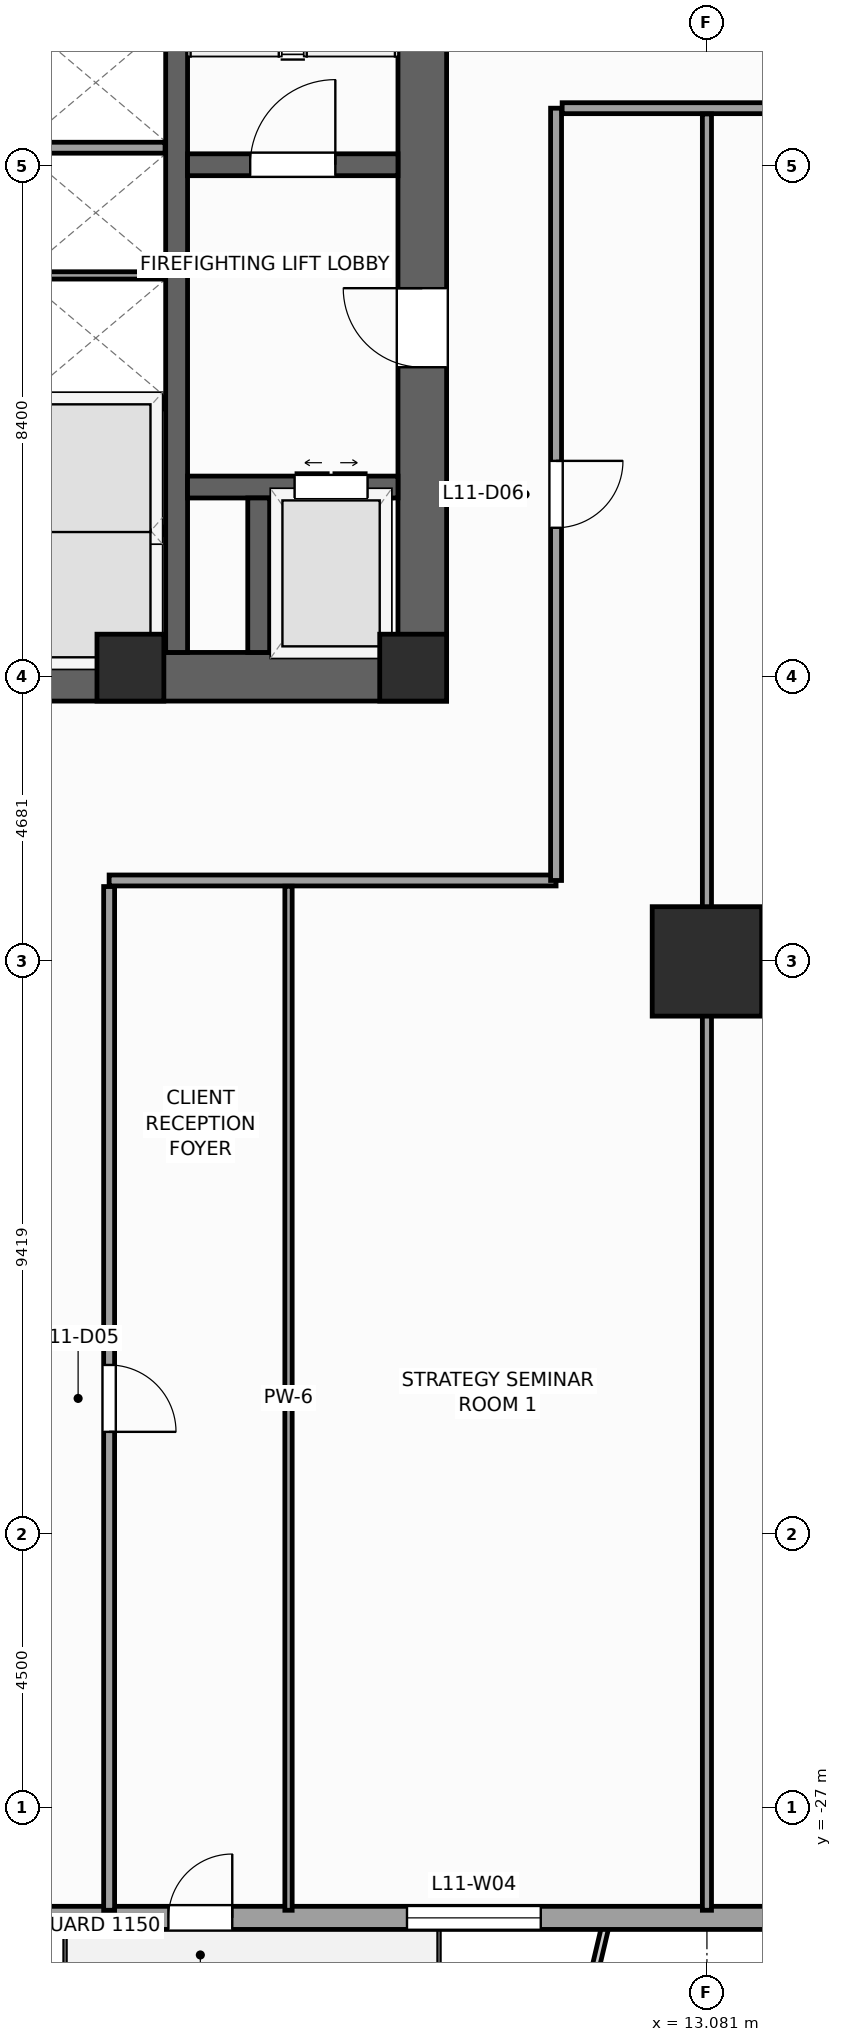
"""IFC4 building model, lengths in metres.
Left out: names, types, materials, properties, quantities, classifications, styles, units other than length and angle.
Written with IfcOpenShell. Run it as: python <this file> out.ifc"""

import sys

from ifc_helpers import new_model, si_unit, direction, frame, frame_2d, origin, origin_2d, place, context, subcontext, project, spatial, rectangle, extrude, source, transform, mapped, element, fill, save


model = new_model("IFC4")
c1 = context("Model", 3, precision=1e-05, world=origin(), true_north=direction((0.0, 1.0)))
c2 = subcontext(c1, "Body", "Model", "MODEL_VIEW")
j1 = project(units=[si_unit("LENGTHUNIT", "METRE"), si_unit("PLANEANGLEUNIT", "RADIAN")], contexts=[c1])
p1 = place(None, origin())
s1 = spatial("IfcSite", under=j1, at=p1, CompositionType="ELEMENT")
p2 = place(p1, origin())
s2 = spatial("IfcBuilding", under=s1, at=p2, CompositionType="ELEMENT")
p3 = place(p2, frame((0.0, 0.0, 50.0)))
s3 = spatial("IfcBuildingStorey", under=s2, at=p3, CompositionType="ELEMENT", Elevation=50.0)
p4 = place(p3, frame((-8.8, -8.4, 0.0), z_axis=(0.0, 0.0, 1.0), x_axis=(1.0, 0.0, 0.0)))
e1 = element("IfcWall", 1, at=p4, inside=s3, PredefinedType="SHEAR", context=c2, shape_type="SweptSolid", body=[
    extrude(rectangle(XDim=17.6, YDim=0.8, at=frame_2d((8.8, 0.0))), origin(), (0.0, 0.0, 1.0), 4.0),
])
p5 = place(p4, frame((8.15, 0.0, 0.0)))
e2 = element("IfcOpeningElement", 2, at=p5, cuts=e1, PredefinedType="OPENING", context=c2, shape_type="SweptSolid", body=[
    extrude(rectangle(XDim=1.3, YDim=2.2, at=frame_2d((0.65, 1.1))), frame((0.0, 0.41, 0.0), z_axis=(0.0, -1.0, 0.0), x_axis=(1.0, 0.0, 0.0)), (0.0, 0.0, 1.0), 0.82),
])
p6 = place(p3, frame((8.4, -8.0, 0.0), z_axis=(0.0, 0.0, 1.0), x_axis=(0.0, 1.0, 0.0)))
e3 = element("IfcWall", 3, at=p6, inside=s3, PredefinedType="SHEAR", context=c2, shape_type="SweptSolid", body=[
    extrude(rectangle(XDim=16.0, YDim=0.8, at=frame_2d((8.0, 0.0))), origin(), (0.0, 0.0, 1.0), 4.0),
])
p7 = place(p6, frame((4.69, 0.0, 0.0)))
e4 = element("IfcOpeningElement", 4, at=p7, cuts=e3, PredefinedType="OPENING", context=c2, shape_type="SweptSolid", body=[
    extrude(rectangle(XDim=1.3, YDim=2.2, at=frame_2d((0.65, 1.1))), frame((0.0, 0.41, 0.0), z_axis=(0.0, -1.0, 0.0), x_axis=(1.0, 0.0, 0.0)), (0.0, 0.0, 1.0), 0.82),
])
p8 = place(p3, frame((4.36, -8.0, 0.0), z_axis=(0.0, 0.0, 1.0), x_axis=(0.0, 1.0, 0.0)))
e5 = element("IfcWall", 5, at=p8, inside=s3, PredefinedType="SHEAR", context=c2, shape_type="SweptSolid", body=[
    extrude(rectangle(XDim=16.0, YDim=0.36, at=frame_2d((8.0, 0.0))), origin(), (0.0, 0.0, 1.0), 4.0),
])
p9 = place(p3, frame((4.54, 0.02, 0.0), z_axis=(0.0, 0.0, 1.0), x_axis=(1.0, 0.0, 0.0)))
e6 = element("IfcWall", 6, at=p9, inside=s3, PredefinedType="SHEAR", context=c2, shape_type="SweptSolid", body=[
    extrude(rectangle(XDim=3.46, YDim=0.36, at=frame_2d((1.73, 0.0))), origin(), (0.0, 0.0, 1.0), 4.0),
])
p10 = place(p9, frame((1.03, 0.0, 0.0)))
e7 = element("IfcOpeningElement", 7, at=p10, cuts=e6, PredefinedType="OPENING", context=c2, shape_type="SweptSolid", body=[
    extrude(rectangle(XDim=1.4, YDim=2.2, at=frame_2d((0.7, 1.1))), frame((0.0, 0.19, 0.0), z_axis=(0.0, -1.0, 0.0), x_axis=(1.0, 0.0, 0.0)), (0.0, 0.0, 1.0), 0.38),
])
p11 = place(p3, frame((4.54, -5.28, 0.0), z_axis=(0.0, 0.0, 1.0), x_axis=(1.0, 0.0, 0.0)))
e8 = element("IfcWall", 8, at=p11, inside=s3, PredefinedType="SHEAR", context=c2, shape_type="SweptSolid", body=[
    extrude(rectangle(XDim=3.46, YDim=0.36, at=frame_2d((1.73, 0.0))), origin(), (0.0, 0.0, 1.0), 4.0),
])
p12 = place(p11, frame((1.76, 0.0, 0.0)))
e9 = element("IfcOpeningElement", 9, at=p12, cuts=e8, PredefinedType="OPENING", context=c2, shape_type="SweptSolid", body=[
    extrude(rectangle(XDim=1.2, YDim=2.25, at=frame_2d((0.6, 1.125))), frame((0.0, 0.19, 0.0), z_axis=(0.0, -1.0, 0.0), x_axis=(1.0, 0.0, 0.0)), (0.0, 0.0, 1.0), 0.38),
])
p13 = place(p3, frame((5.71, -8.0, 0.0), z_axis=(0.0, 0.0, 1.0), x_axis=(0.0, 1.0, 0.0)))
e10 = element("IfcWall", 10, at=p13, inside=s3, PredefinedType="SHEAR", context=c2, shape_type="SweptSolid", body=[
    extrude(rectangle(XDim=2.54, YDim=0.36, at=frame_2d((1.27, 0.0))), origin(), (0.0, 0.0, 1.0), 4.0),
])
m1 = source(origin(), c2, "Body", "SweptSolid", [
    extrude(rectangle(XDim=1.1, YDim=1.1, at=origin_2d()), origin(), (0.0, 0.0, 1.0), 4.0),
])
for number, where, z_axis, x_axis in (
    (11, (8.25, -8.25, 0.0), (0.0, 0.0, 1.0), (1.0, 0.0, 0.0)),
    (12, (3.6, -8.25, 0.0), (0.0, 0.0, 1.0), (1.0, 0.0, 0.0)),
):
    element("IfcColumn", number, at=place(p3, frame(where, z_axis=z_axis, x_axis=x_axis)), inside=s3, PredefinedType="PILASTER", context=c2, shape_type="MappedRepresentation", body=[
        mapped(m1, transform((0.0, 0.0, 0.0), scale=1.0)),
    ])
m2 = source(origin(), c2, "Body", "SweptSolid", [
    extrude(rectangle(XDim=1.8, YDim=1.8, at=origin_2d()), origin(), (0.0, 0.0, 1.0), 4.0),
])
p14 = place(p3, frame((13.081, -13.081, 0.0), z_axis=(0.0, 0.0, 1.0), x_axis=(1.0, 0.0, 0.0)))
e13 = element("IfcColumn", 13, at=p14, inside=s3, PredefinedType="COLUMN", context=c2, shape_type="MappedRepresentation", body=[
    mapped(m2, transform((0.0, 0.0, 0.0), scale=1.0)),
])
p15 = place(p3, frame((-25.69, -28.81, 0.0), z_axis=(0.0, 0.0, 1.0), x_axis=(1.0, 0.0, 0.0)))
e14 = element("IfcWall", 14, at=p15, inside=s3, PredefinedType="STANDARD", context=c2, shape_type="SweptSolid", body=[
    extrude(rectangle(XDim=51.38, YDim=0.38, at=frame_2d((25.69, 0.0))), origin(), (0.0, 0.0, 1.0), 3.12),
])
p16 = place(p15, frame((29.915, 0.0, 0.0)))
e15 = element("IfcOpeningElement", 15, at=p16, cuts=e14, PredefinedType="OPENING", context=c2, shape_type="SweptSolid", body=[
    extrude(rectangle(XDim=1.05, YDim=2.25, at=frame_2d((0.525, 1.125))), frame((0.0, 0.2, 0.0), z_axis=(0.0, -1.0, 0.0), x_axis=(1.0, 0.0, 0.0)), (0.0, 0.0, 1.0), 0.4),
])
p17 = place(p15, frame((5.466, 0.0, 0.49)))
e16 = element("IfcOpeningElement", 16, at=p17, cuts=e14, PredefinedType="OPENING", context=c2, shape_type="SweptSolid", body=[
    extrude(rectangle(XDim=1.4, YDim=2.4, at=frame_2d((0.7, 1.2))), frame((0.0, 0.2, 0.0), z_axis=(0.0, -1.0, 0.0), x_axis=(1.0, 0.0, 0.0)), (0.0, 0.0, 1.0), 0.4),
])
p18 = place(p15, frame((13.8, 0.0, 0.49)))
e17 = element("IfcOpeningElement", 17, at=p18, cuts=e14, PredefinedType="OPENING", context=c2, shape_type="SweptSolid", body=[
    extrude(rectangle(XDim=2.2, YDim=2.4, at=frame_2d((1.1, 1.2))), frame((0.0, 0.2, 0.0), z_axis=(0.0, -1.0, 0.0), x_axis=(1.0, 0.0, 0.0)), (0.0, 0.0, 1.0), 0.4),
])
p19 = place(p15, frame((22.062, 0.0, 0.49)))
e18 = element("IfcOpeningElement", 18, at=p19, cuts=e14, PredefinedType="OPENING", context=c2, shape_type="SweptSolid", body=[
    extrude(rectangle(XDim=2.2, YDim=2.4, at=frame_2d((1.1, 1.2))), frame((0.0, 0.2, 0.0), z_axis=(0.0, -1.0, 0.0), x_axis=(1.0, 0.0, 0.0)), (0.0, 0.0, 1.0), 0.4),
])
p20 = place(p15, frame((33.838, 0.0, 0.49)))
e19 = element("IfcOpeningElement", 19, at=p20, cuts=e14, PredefinedType="OPENING", context=c2, shape_type="SweptSolid", body=[
    extrude(rectangle(XDim=2.2, YDim=2.4, at=frame_2d((1.1, 1.2))), frame((0.0, 0.2, 0.0), z_axis=(0.0, -1.0, 0.0), x_axis=(1.0, 0.0, 0.0)), (0.0, 0.0, 1.0), 0.4),
])
p21 = place(p15, frame((43.487, 0.0, 0.49)))
e20 = element("IfcOpeningElement", 20, at=p21, cuts=e14, PredefinedType="OPENING", context=c2, shape_type="SweptSolid", body=[
    extrude(rectangle(XDim=1.4, YDim=2.4, at=frame_2d((0.7, 1.2))), frame((0.0, 0.2, 0.0), z_axis=(0.0, -1.0, 0.0), x_axis=(1.0, 0.0, 0.0)), (0.0, 0.0, 1.0), 0.4),
])
for number, where, z_axis, x_axis in (
    (21, (1.89, -3.9, 0.0), (0.0, 0.0, 1.0), (1.0, 0.0, 0.0)),
    (22, (1.89, 0.3, 0.0), (0.0, 0.0, 1.0), (1.0, 0.0, 0.0)),
):
    element("IfcWall", number, at=place(p3, frame(where, z_axis=z_axis, x_axis=x_axis)), inside=s3, PredefinedType="PARTITIONING", context=c2, shape_type="SweptSolid", body=[
        extrude(rectangle(XDim=2.28, YDim=0.18, at=frame_2d((1.14, 0.0))), origin(), (0.0, 0.0, 1.0), 3.72),
    ])
for number, where, z_axis, x_axis in (
    (23, (1.9, -6.0, 0.0), (0.0, 0.0, 1.0), (1.0, 0.0, 0.0)),
    (24, (1.9, -1.8, 0.0), (0.0, 0.0, 1.0), (1.0, 0.0, 0.0)),
):
    element("IfcWall", number, at=place(p3, frame(where, z_axis=z_axis, x_axis=x_axis)), inside=s3, PredefinedType="PARTITIONING", context=c2, shape_type="SweptSolid", body=[
        extrude(rectangle(XDim=2.26, YDim=0.12, at=frame_2d((1.13, 0.0))), origin(), (0.0, 0.0, 1.0), 3.72),
    ])
p22 = place(p3, frame((3.25, -11.75, 0.0), z_axis=(0.0, 0.0, 1.0), x_axis=(1.0, 0.0, 0.0)))
e25 = element("IfcWall", 25, at=p22, inside=s3, PredefinedType="PARTITIONING", context=c2, shape_type="SweptSolid", body=[
    extrude(rectangle(XDim=7.35, YDim=0.18, at=frame_2d((3.675, 0.0))), origin(), (0.0, 0.0, 1.0), 3.72),
])
p23 = place(p3, frame((10.6, -11.75, 0.0), z_axis=(0.0, 0.0, 1.0), x_axis=(0.0, 1.0, 0.0)))
e26 = element("IfcWall", 26, at=p23, inside=s3, PredefinedType="PARTITIONING", context=c2, shape_type="SweptSolid", body=[
    extrude(rectangle(XDim=12.7, YDim=0.18, at=frame_2d((6.35, 0.0))), origin(), (0.0, 0.0, 1.0), 3.72),
])
p24 = place(p23, frame((5.8, 0.0, 0.0)))
e27 = element("IfcOpeningElement", 27, at=p24, cuts=e26, PredefinedType="OPENING", context=c2, shape_type="SweptSolid", body=[
    extrude(rectangle(XDim=1.1, YDim=2.2, at=frame_2d((0.55, 1.1))), frame((0.0, 0.1, 0.0), z_axis=(0.0, -1.0, 0.0), x_axis=(1.0, 0.0, 0.0)), (0.0, 0.0, 1.0), 0.2),
])
p25 = place(p3, frame((10.7, 0.95, 0.0), z_axis=(0.0, 0.0, 1.0), x_axis=(1.0, 0.0, 0.0)))
e28 = element("IfcWall", 28, at=p25, inside=s3, PredefinedType="PARTITIONING", context=c2, shape_type="SweptSolid", body=[
    extrude(rectangle(XDim=17.985, YDim=0.18, at=frame_2d((8.993, 0.0))), origin(), (0.0, 0.0, 1.0), 3.72),
])
p26 = place(p25, frame((9.469, 0.0, 0.0)))
e29 = element("IfcOpeningElement", 29, at=p26, cuts=e28, PredefinedType="OPENING", context=c2, shape_type="SweptSolid", body=[
    extrude(rectangle(XDim=1.1, YDim=2.2, at=frame_2d((0.55, 1.1))), frame((0.0, 0.1, 0.0), z_axis=(0.0, -1.0, 0.0), x_axis=(1.0, 0.0, 0.0)), (0.0, 0.0, 1.0), 0.2),
])
p27 = place(p3, frame((3.25, -28.685, 0.0), z_axis=(0.0, 0.0, 1.0), x_axis=(0.0, 1.0, 0.0)))
e30 = element("IfcWall", 30, at=p27, inside=s3, PredefinedType="PARTITIONING", context=c2, shape_type="SweptSolid", body=[
    extrude(rectangle(XDim=16.835, YDim=0.18, at=frame_2d((8.417, 0.0))), origin(), (0.0, 0.0, 1.0), 3.72),
])
p28 = place(p27, frame((7.867, 0.0, 0.0)))
e31 = element("IfcOpeningElement", 31, at=p28, cuts=e30, PredefinedType="OPENING", context=c2, shape_type="SweptSolid", body=[
    extrude(rectangle(XDim=1.1, YDim=2.2, at=frame_2d((0.55, 1.1))), frame((0.0, 0.1, 0.0), z_axis=(0.0, -1.0, 0.0), x_axis=(1.0, 0.0, 0.0)), (0.0, 0.0, 1.0), 0.2),
])
p29 = place(p3, frame((6.2, -28.685, 0.0), z_axis=(0.0, 0.0, 1.0), x_axis=(0.0, 1.0, 0.0)))
e32 = element("IfcWall", 32, at=p29, inside=s3, PredefinedType="PARTITIONING", context=c2, shape_type="SweptSolid", body=[
    extrude(rectangle(XDim=16.84, YDim=0.12, at=frame_2d((8.42, 0.0))), origin(), (0.0, 0.0, 1.0), 3.72),
])
p30 = place(p3, frame((13.081, -28.685, 0.0), z_axis=(0.0, 0.0, 1.0), x_axis=(0.0, 1.0, 0.0)))
e33 = element("IfcWall", 33, at=p30, inside=s3, PredefinedType="PARTITIONING", context=c2, shape_type="SweptSolid", body=[
    extrude(rectangle(XDim=29.54, YDim=0.15, at=frame_2d((14.77, 0.0))), origin(), (0.0, 0.0, 1.0), 2.712),
])
m3 = source(origin(), c2, "Body", "SweptSolid", [
    extrude(rectangle(XDim=1.05, YDim=2.25, at=frame_2d((0.525, 1.125))), frame((0.0, 0.025, 0.0), z_axis=(0.0, -1.0, 0.0), x_axis=(1.0, 0.0, 0.0)), (0.0, 0.0, 1.0), 0.05),
])
p31 = place(p16, origin())
e34 = element("IfcDoor", 34, at=p31, inside=s3, OperationType="SINGLE_SWING_RIGHT", PredefinedType="DOOR", context=c2, shape_type="MappedRepresentation", body=[
    mapped(m3, transform((0.0, 0.0, 0.0), scale=1.0)),
])
fill(e15, e34)
m4 = source(origin(), c2, "Body", "SweptSolid", [
    extrude(rectangle(XDim=2.2, YDim=2.4, at=frame_2d((1.1, 1.2))), frame((0.0, 0.03, 0.0), z_axis=(0.0, -1.0, 0.0), x_axis=(1.0, 0.0, 0.0)), (0.0, 0.0, 1.0), 0.06),
])
p32 = place(p20, origin())
e35 = element("IfcWindow", 35, at=p32, inside=s3, PartitioningType="SINGLE_PANEL", PredefinedType="WINDOW", context=c2, shape_type="MappedRepresentation", body=[
    mapped(m4, transform((0.0, 0.0, 0.0), scale=1.0)),
])
fill(e19, e35)
m5 = source(origin(), c2, "Body", "SweptSolid", [
    extrude(rectangle(XDim=1.4, YDim=2.2, at=frame_2d((0.7, 1.1))), frame((0.0, 0.025, 0.0), z_axis=(0.0, -1.0, 0.0), x_axis=(1.0, 0.0, 0.0)), (0.0, 0.0, 1.0), 0.05),
])
p33 = place(p10, origin())
e36 = element("IfcDoor", 36, at=p33, inside=s3, OperationType="SINGLE_SWING_RIGHT", PredefinedType="DOOR", context=c2, shape_type="MappedRepresentation", body=[
    mapped(m5, transform((0.0, 0.0, 0.0), scale=1.0)),
])
fill(e7, e36)
m6 = source(origin(), c2, "Body", "SweptSolid", [
    extrude(rectangle(XDim=1.3, YDim=2.2, at=frame_2d((0.65, 1.1))), frame((0.0, 0.025, 0.0), z_axis=(0.0, -1.0, 0.0), x_axis=(1.0, 0.0, 0.0)), (0.0, 0.0, 1.0), 0.05),
])
p34 = place(p7, origin())
e37 = element("IfcDoor", 37, at=p34, inside=s3, OperationType="SINGLE_SWING_RIGHT", PredefinedType="DOOR", context=c2, shape_type="MappedRepresentation", body=[
    mapped(m6, transform((0.0, 0.0, 0.0), scale=1.0)),
])
fill(e4, e37)
m7 = source(origin(), c2, "Body", "SweptSolid", [
    extrude(rectangle(XDim=1.2, YDim=2.25, at=frame_2d((0.6, 1.125))), frame((0.0, 0.025, 0.0), z_axis=(0.0, -1.0, 0.0), x_axis=(1.0, 0.0, 0.0)), (0.0, 0.0, 1.0), 0.05),
])
p35 = place(p12, origin())
e38 = element("IfcDoor", 38, at=p35, inside=s3, OperationType="DOUBLE_DOOR_SLIDING", PredefinedType="DOOR", context=c2, shape_type="MappedRepresentation", body=[
    mapped(m7, transform((0.0, 0.0, 0.0), scale=1.0)),
])
fill(e9, e38)
m8 = source(origin(), c2, "Body", "SweptSolid", [
    extrude(rectangle(XDim=1.1, YDim=2.2, at=frame_2d((0.55, 1.1))), frame((0.0, 0.025, 0.0), z_axis=(0.0, -1.0, 0.0), x_axis=(1.0, 0.0, 0.0)), (0.0, 0.0, 1.0), 0.05),
])
p36 = place(p28, frame((1.1, 0.0, 0.0), z_axis=(0.0, 0.0, 1.0), x_axis=(-1.0, 0.0, 0.0)))
e39 = element("IfcDoor", 39, at=p36, inside=s3, OperationType="SINGLE_SWING_LEFT", PredefinedType="DOOR", context=c2, shape_type="MappedRepresentation", body=[
    mapped(m8, transform((0.0, 0.0, 0.0), scale=1.0)),
])
fill(e31, e39)
p37 = place(p24, frame((1.1, 0.0, 0.0), z_axis=(0.0, 0.0, 1.0), x_axis=(-1.0, 0.0, 0.0)))
e40 = element("IfcDoor", 40, at=p37, inside=s3, OperationType="SINGLE_SWING_RIGHT", PredefinedType="DOOR", context=c2, shape_type="MappedRepresentation", body=[
    mapped(m8, transform((0.0, 0.0, 0.0), scale=1.0)),
])
fill(e27, e40)
save(model, sys.argv[1])
